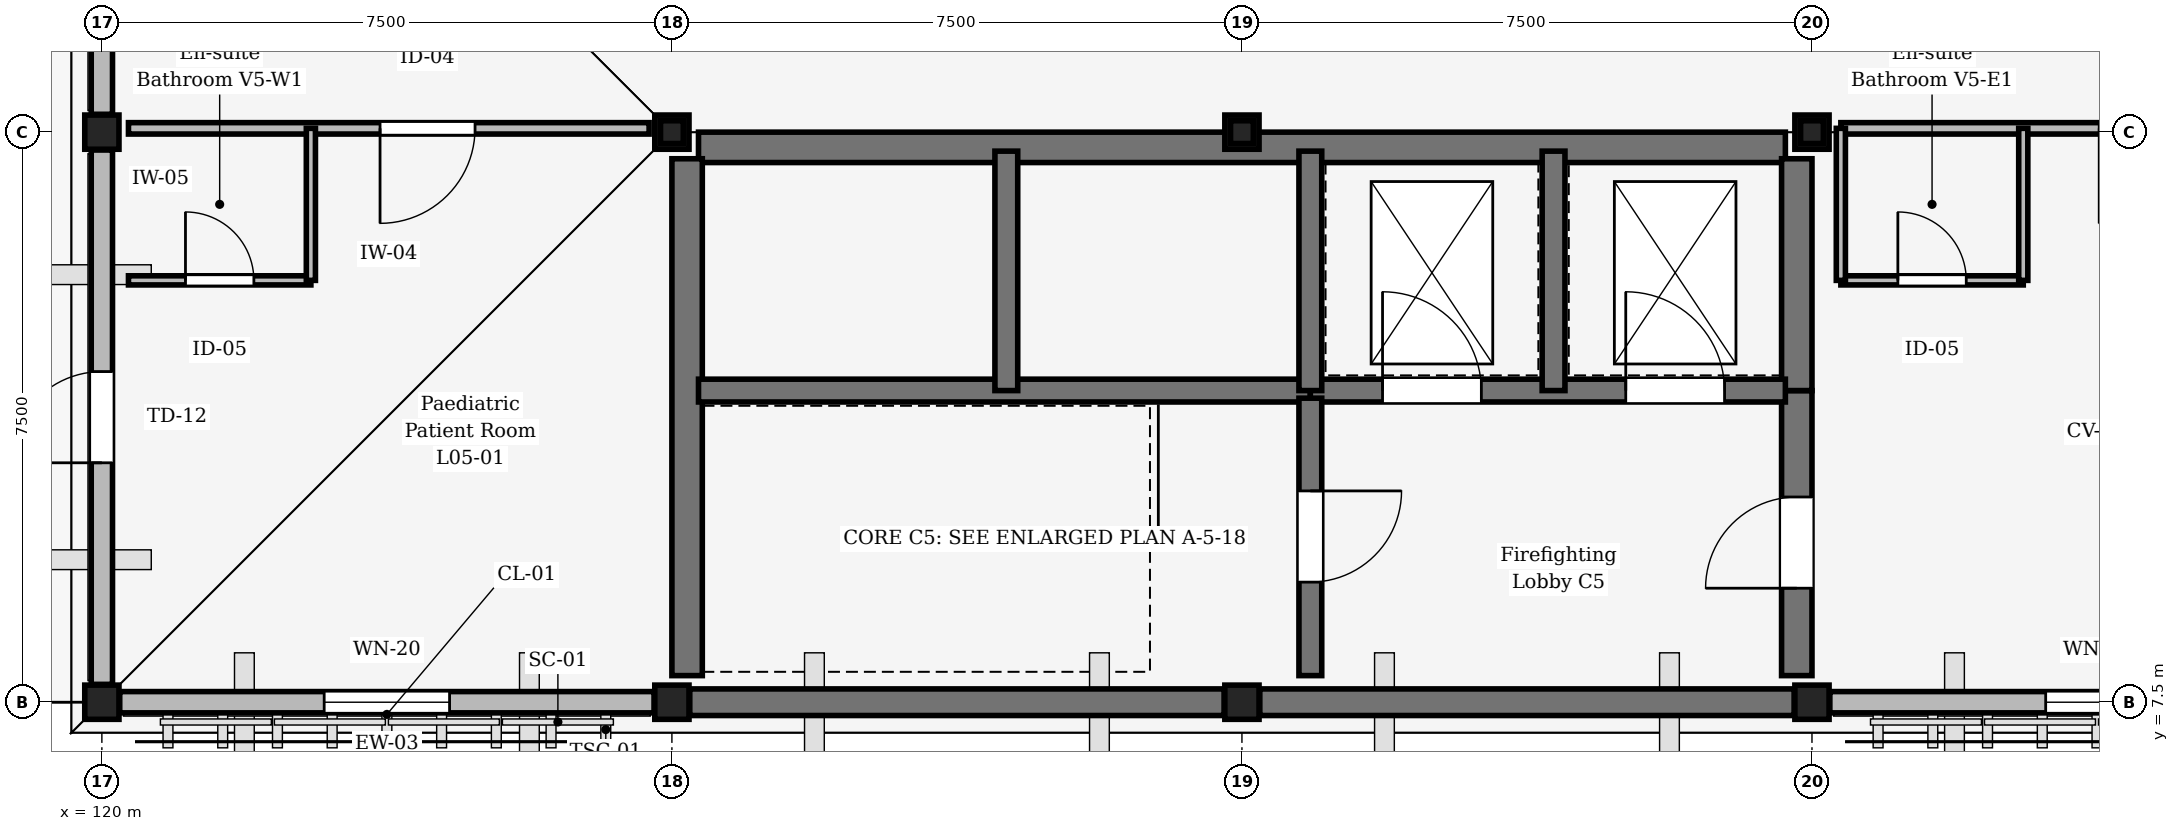
"""IFC4 building model, lengths in metres.
Left out: names, types, materials, properties, quantities, classifications, styles, units other than length and angle.
Written with IfcOpenShell. Run it as: python <this file> out.ifc"""

import sys

from ifc_helpers import new_model, si_unit, direction, frame, frame_2d, origin, origin_2d, place, context, subcontext, project, spatial, rectangle, i_section, extrude, element, fill, save


model = new_model("IFC4")
c1 = context("Model", 3, precision=1e-05, world=origin(), true_north=direction((0.0, 1.0)))
c2 = subcontext(c1, "Body", "Model", "MODEL_VIEW")
j1 = project(units=[si_unit("LENGTHUNIT", "METRE"), si_unit("PLANEANGLEUNIT", "RADIAN")], contexts=[c1])
p1 = place(None, origin())
s1 = spatial("IfcSite", under=j1, at=p1, CompositionType="ELEMENT")
p2 = place(p1, origin())
s2 = spatial("IfcBuilding", under=s1, at=p2, CompositionType="ELEMENT")
p3 = place(p2, frame((0.0, 0.0, 21.9)))
s3 = spatial("IfcBuildingStorey", under=s2, at=p3, CompositionType="ELEMENT", Elevation=21.9)
for number, where, z_axis, x_axis in (
    (1, (120.0, 7.5, 0.0), (0.0, 0.0, 1.0), (1.0, 0.0, 0.0)),
    (2, (120.0, 15.0, 0.0), (0.0, 0.0, 1.0), (1.0, 0.0, 0.0)),
    (3, (127.5, 7.5, 0.0), (0.0, 0.0, 1.0), (1.0, 0.0, 0.0)),
    (4, (127.5, 15.0, 0.0), (0.0, 0.0, 1.0), (1.0, 0.0, 0.0)),
    (5, (135.0, 7.5, 0.0), (0.0, 0.0, 1.0), (1.0, 0.0, 0.0)),
    (6, (135.0, 15.0, 0.0), (0.0, 0.0, 1.0), (1.0, 0.0, 0.0)),
    (7, (142.5, 7.5, 0.0), (0.0, 0.0, 1.0), (1.0, 0.0, 0.0)),
    (8, (142.5, 15.0, 0.0), (0.0, 0.0, 1.0), (1.0, 0.0, 0.0)),
):
    element("IfcColumn", number, at=place(p3, frame(where, z_axis=z_axis, x_axis=x_axis)), inside=s3, PredefinedType="COLUMN", context=c2, shape_type="SweptSolid", body=[
        extrude(rectangle(XDim=0.45, YDim=0.45, at=origin_2d()), origin(), (0.0, 0.0, 1.0), 4.05),
    ])
for number, where, z_axis, x_axis in (
    (9, (127.5, 15.0, 4.05), (0.0, 0.0, 1.0), (1.0, 0.0, 0.0)),
    (10, (135.0, 15.0, 4.05), (0.0, 0.0, 1.0), (1.0, 0.0, 0.0)),
    (11, (142.5, 15.0, 4.05), (0.0, 0.0, 1.0), (1.0, 0.0, 0.0)),
):
    element("IfcColumn", number, at=place(p3, frame(where, z_axis=z_axis, x_axis=x_axis)), inside=s3, PredefinedType="COLUMN", context=c2, shape_type="SweptSolid", body=[
        extrude(i_section(OverallWidth=0.3, OverallDepth=0.3, WebThickness=0.011, FlangeThickness=0.019, FilletRadius=0.027, at=origin_2d()), origin(), (0.0, 0.0, 1.0), 1.97),
    ])
p4 = place(p3, frame((127.265, 7.5, 0.0), z_axis=(0.0, 0.0, 1.0), x_axis=(-1.0, 0.0, 0.0)))
e12 = element("IfcWall", 12, at=p4, inside=s3, PredefinedType="STANDARD", context=c2, shape_type="SweptSolid", body=[
    extrude(rectangle(XDim=7.03, YDim=0.28, at=frame_2d((3.515, 0.0))), origin(), (0.0, 0.0, 1.0), 3.77),
])
p5 = place(p4, frame((2.69, 0.0, 0.85)))
e13 = element("IfcOpeningElement", 13, at=p5, cuts=e12, PredefinedType="OPENING", context=c2, shape_type="SweptSolid", body=[
    extrude(rectangle(XDim=1.65, YDim=2.25, at=frame_2d((0.825, 1.125))), frame((0.0, 0.15, 0.0), z_axis=(0.0, -1.0, 0.0), x_axis=(1.0, 0.0, 0.0)), (0.0, 0.0, 1.0), 0.3),
])
p6 = place(p3, frame((120.0, 7.735, 0.0), z_axis=(0.0, 0.0, 1.0), x_axis=(0.0, 1.0, 0.0)))
e14 = element("IfcWall", 14, at=p6, inside=s3, PredefinedType="STANDARD", context=c2, shape_type="SweptSolid", body=[
    extrude(rectangle(XDim=7.03, YDim=0.28, at=frame_2d((3.515, 0.0))), origin(), (0.0, 0.0, 1.0), 3.77),
])
p7 = place(p6, frame((2.915, 0.0, 0.0)))
e15 = element("IfcOpeningElement", 15, at=p7, cuts=e14, PredefinedType="OPENING", context=c2, shape_type="SweptSolid", body=[
    extrude(rectangle(XDim=1.2, YDim=2.3, at=frame_2d((0.6, 1.15))), frame((0.0, 0.15, 0.0), z_axis=(0.0, -1.0, 0.0), x_axis=(1.0, 0.0, 0.0)), (0.0, 0.0, 1.0), 0.3),
])
p8 = place(p3, frame((120.0, 15.235, 0.0), z_axis=(0.0, 0.0, 1.0), x_axis=(0.0, 1.0, 0.0)))
e16 = element("IfcWall", 16, at=p8, inside=s3, PredefinedType="STANDARD", context=c2, shape_type="SweptSolid", body=[
    extrude(rectangle(XDim=7.115, YDim=0.28, at=frame_2d((3.558, 0.0))), origin(), (0.0, 0.0, 1.0), 3.77),
])
p9 = place(p8, frame((2.958, 0.0, 0.0)))
e17 = element("IfcOpeningElement", 17, at=p9, cuts=e16, PredefinedType="OPENING", context=c2, shape_type="SweptSolid", body=[
    extrude(rectangle(XDim=1.2, YDim=2.3, at=frame_2d((0.6, 1.15))), frame((0.0, 0.15, 0.0), z_axis=(0.0, -1.0, 0.0), x_axis=(1.0, 0.0, 0.0)), (0.0, 0.0, 1.0), 0.3),
])
for number, where, z_axis, x_axis in (
    (18, (134.765, 7.5, 0.0), (0.0, 0.0, 1.0), (-1.0, 0.0, 0.0)),
    (19, (142.265, 7.5, 0.0), (0.0, 0.0, 1.0), (-1.0, 0.0, 0.0)),
):
    element("IfcWall", number, at=place(p3, frame(where, z_axis=z_axis, x_axis=x_axis)), inside=s3, PredefinedType="SHEAR", context=c2, shape_type="SweptSolid", body=[
        extrude(rectangle(XDim=7.03, YDim=0.35, at=frame_2d((3.515, 0.0))), origin(), (0.0, 0.0, 1.0), 3.77),
    ])
p10 = place(p3, frame((149.765, 7.5, 0.0), z_axis=(0.0, 0.0, 1.0), x_axis=(-1.0, 0.0, 0.0)))
e20 = element("IfcWall", 20, at=p10, inside=s3, PredefinedType="STANDARD", context=c2, shape_type="SweptSolid", body=[
    extrude(rectangle(XDim=7.03, YDim=0.28, at=frame_2d((3.515, 0.0))), origin(), (0.0, 0.0, 1.0), 3.77),
])
p11 = place(p10, frame((2.84, 0.0, 0.85)))
e21 = element("IfcOpeningElement", 21, at=p11, cuts=e20, PredefinedType="OPENING", context=c2, shape_type="SweptSolid", body=[
    extrude(rectangle(XDim=1.35, YDim=2.25, at=frame_2d((0.675, 1.125))), frame((0.0, 0.15, 0.0), z_axis=(0.0, -1.0, 0.0), x_axis=(1.0, 0.0, 0.0)), (0.0, 0.0, 1.0), 0.3),
])
p12 = place(p3, frame((127.85, 14.8, 0.0), z_axis=(0.0, 0.0, 1.0), x_axis=(1.0, 0.0, 0.0)))
e22 = element("IfcWall", 22, at=p12, inside=s3, PredefinedType="SHEAR", context=c2, shape_type="SweptSolid", body=[
    extrude(rectangle(XDim=14.3, YDim=0.4, at=frame_2d((7.15, 0.0))), origin(), (0.0, 0.0, 1.0), 3.77),
])
p13 = place(p3, frame((127.7, 7.85, 0.0), z_axis=(0.0, 0.0, 1.0), x_axis=(0.0, 1.0, 0.0)))
e23 = element("IfcWall", 23, at=p13, inside=s3, PredefinedType="SHEAR", context=c2, shape_type="SweptSolid", body=[
    extrude(rectangle(XDim=6.8, YDim=0.4, at=frame_2d((3.4, 0.0))), origin(), (0.0, 0.0, 1.0), 3.77),
])
p14 = place(p3, frame((142.3, 7.85, 0.0), z_axis=(0.0, 0.0, 1.0), x_axis=(0.0, 1.0, 0.0)))
e24 = element("IfcWall", 24, at=p14, inside=s3, PredefinedType="SHEAR", context=c2, shape_type="SweptSolid", body=[
    extrude(rectangle(XDim=3.75, YDim=0.4, at=frame_2d((1.875, 0.0))), origin(), (0.0, 0.0, 1.0), 3.77),
])
p15 = place(p14, frame((1.15, 0.0, 0.0)))
e25 = element("IfcOpeningElement", 25, at=p15, cuts=e24, PredefinedType="OPENING", context=c2, shape_type="SweptSolid", body=[
    extrude(rectangle(XDim=1.2, YDim=2.25, at=frame_2d((0.6, 1.125))), frame((0.0, 0.21, 0.0), z_axis=(0.0, -1.0, 0.0), x_axis=(1.0, 0.0, 0.0)), (0.0, 0.0, 1.0), 0.42),
])
p16 = place(p3, frame((142.3, 11.6, 0.0), z_axis=(0.0, 0.0, 1.0), x_axis=(0.0, 1.0, 0.0)))
e26 = element("IfcWall", 26, at=p16, inside=s3, PredefinedType="SHEAR", context=c2, shape_type="SweptSolid", body=[
    extrude(rectangle(XDim=3.05, YDim=0.4, at=frame_2d((1.525, 0.0))), origin(), (0.0, 0.0, 1.0), 3.77),
])
p17 = place(p3, frame((127.85, 11.6, 0.0), z_axis=(0.0, 0.0, 1.0), x_axis=(1.0, 0.0, 0.0)))
e27 = element("IfcWall", 27, at=p17, inside=s3, PredefinedType="SHEAR", context=c2, shape_type="SweptSolid", body=[
    extrude(rectangle(XDim=8.05, YDim=0.3, at=frame_2d((4.025, 0.0))), origin(), (0.0, 0.0, 1.0), 3.77),
])
p18 = place(p3, frame((135.9, 11.6, 0.0), z_axis=(0.0, 0.0, 1.0), x_axis=(1.0, 0.0, 0.0)))
e28 = element("IfcWall", 28, at=p18, inside=s3, PredefinedType="SHEAR", context=c2, shape_type="SweptSolid", body=[
    extrude(rectangle(XDim=6.25, YDim=0.3, at=frame_2d((3.125, 0.0))), origin(), (0.0, 0.0, 1.0), 3.77),
])
p19 = place(p18, frame((0.95, 0.0, 0.0)))
e29 = element("IfcOpeningElement", 29, at=p19, cuts=e28, PredefinedType="OPENING", context=c2, shape_type="SweptSolid", body=[
    extrude(rectangle(XDim=1.3, YDim=2.2, at=frame_2d((0.65, 1.1))), frame((0.0, 0.16, 0.0), z_axis=(0.0, -1.0, 0.0), x_axis=(1.0, 0.0, 0.0)), (0.0, 0.0, 1.0), 0.32),
])
p20 = place(p18, frame((4.15, 0.0, 0.0)))
e30 = element("IfcOpeningElement", 30, at=p20, cuts=e28, PredefinedType="OPENING", context=c2, shape_type="SweptSolid", body=[
    extrude(rectangle(XDim=1.3, YDim=2.2, at=frame_2d((0.65, 1.1))), frame((0.0, 0.16, 0.0), z_axis=(0.0, -1.0, 0.0), x_axis=(1.0, 0.0, 0.0)), (0.0, 0.0, 1.0), 0.32),
])
p21 = place(p3, frame((135.9, 11.5, 0.0), z_axis=(0.0, 0.0, 1.0), x_axis=(0.0, -1.0, 0.0)))
e31 = element("IfcWall", 31, at=p21, inside=s3, PredefinedType="SHEAR", context=c2, shape_type="SweptSolid", body=[
    extrude(rectangle(XDim=3.65, YDim=0.3, at=frame_2d((1.825, 0.0))), origin(), (0.0, 0.0, 1.0), 3.77),
])
p22 = place(p21, frame((1.22, 0.0, 0.0)))
e32 = element("IfcOpeningElement", 32, at=p22, cuts=e31, PredefinedType="OPENING", context=c2, shape_type="SweptSolid", body=[
    extrude(rectangle(XDim=1.2, YDim=2.25, at=frame_2d((0.6, 1.125))), frame((0.0, 0.16, 0.0), z_axis=(0.0, -1.0, 0.0), x_axis=(1.0, 0.0, 0.0)), (0.0, 0.0, 1.0), 0.32),
])
for number, where, z_axis, x_axis in (
    (33, (131.9, 11.6, 0.0), (0.0, 0.0, 1.0), (0.0, 1.0, 0.0)),
    (34, (135.9, 11.6, 0.0), (0.0, 0.0, 1.0), (0.0, 1.0, 0.0)),
    (35, (139.1, 11.6, 0.0), (0.0, 0.0, 1.0), (0.0, 1.0, 0.0)),
):
    element("IfcWall", number, at=place(p3, frame(where, z_axis=z_axis, x_axis=x_axis)), inside=s3, PredefinedType="SHEAR", context=c2, shape_type="SweptSolid", body=[
        extrude(rectangle(XDim=3.15, YDim=0.3, at=frame_2d((1.575, 0.0))), origin(), (0.0, 0.0, 1.0), 3.77),
    ])
p23 = place(p3, frame((127.2, 15.05, 0.0), z_axis=(0.0, 0.0, 1.0), x_axis=(-1.0, 0.0, 0.0)))
e36 = element("IfcWall", 36, at=p23, inside=s3, PredefinedType="PARTITIONING", context=c2, shape_type="SweptSolid", body=[
    extrude(rectangle(XDim=6.85, YDim=0.15, at=frame_2d((3.425, 0.0))), origin(), (0.0, 0.0, 1.0), 3.755),
])
p24 = place(p23, frame((2.29, 0.0, 0.0)))
e37 = element("IfcOpeningElement", 37, at=p24, cuts=e36, PredefinedType="OPENING", context=c2, shape_type="SweptSolid", body=[
    extrude(rectangle(XDim=1.25, YDim=2.2, at=frame_2d((0.625, 1.1))), frame((0.0, 0.085, 0.0), z_axis=(0.0, -1.0, 0.0), x_axis=(1.0, 0.0, 0.0)), (0.0, 0.0, 1.0), 0.17),
])
p25 = place(p3, frame((120.35, 13.05, 0.0), z_axis=(0.0, 0.0, 1.0), x_axis=(1.0, 0.0, 0.0)))
e38 = element("IfcWall", 38, at=p25, inside=s3, PredefinedType="PARTITIONING", context=c2, shape_type="SweptSolid", body=[
    extrude(rectangle(XDim=2.4, YDim=0.12, at=frame_2d((1.2, 0.0))), origin(), (0.0, 0.0, 1.0), 3.755),
])
p26 = place(p25, frame((0.75, 0.0, 0.0)))
e39 = element("IfcOpeningElement", 39, at=p26, cuts=e38, PredefinedType="OPENING", context=c2, shape_type="SweptSolid", body=[
    extrude(rectangle(XDim=0.9, YDim=2.1, at=frame_2d((0.45, 1.05))), frame((0.0, 0.07, 0.0), z_axis=(0.0, -1.0, 0.0), x_axis=(1.0, 0.0, 0.0)), (0.0, 0.0, 1.0), 0.14),
])
p27 = place(p3, frame((122.75, 13.05, 0.0), z_axis=(0.0, 0.0, 1.0), x_axis=(0.0, 1.0, 0.0)))
e40 = element("IfcWall", 40, at=p27, inside=s3, PredefinedType="PARTITIONING", context=c2, shape_type="SweptSolid", body=[
    extrude(rectangle(XDim=2.0, YDim=0.12, at=frame_2d((1.0, 0.0))), origin(), (0.0, 0.0, 1.0), 3.755),
])
p28 = place(p3, frame((152.503, 15.05, 0.0), z_axis=(0.0, 0.0, 1.0), x_axis=(-1.0, 0.0, 0.0)))
e41 = element("IfcWall", 41, at=p28, inside=s3, PredefinedType="PARTITIONING", context=c2, shape_type="SweptSolid", body=[
    extrude(rectangle(XDim=9.624, YDim=0.15, at=frame_2d((4.812, 0.0))), origin(), (0.0, 0.0, 1.0), 3.755),
])
p29 = place(p28, frame((4.974, 0.0, 0.0)))
e42 = element("IfcOpeningElement", 42, at=p29, cuts=e41, PredefinedType="OPENING", context=c2, shape_type="SweptSolid", body=[
    extrude(rectangle(XDim=1.25, YDim=2.2, at=frame_2d((0.625, 1.1))), frame((0.0, 0.085, 0.0), z_axis=(0.0, -1.0, 0.0), x_axis=(1.0, 0.0, 0.0)), (0.0, 0.0, 1.0), 0.17),
])
p30 = place(p3, frame((142.88, 13.05, 0.0), z_axis=(0.0, 0.0, 1.0), x_axis=(1.0, 0.0, 0.0)))
e43 = element("IfcWall", 43, at=p30, inside=s3, PredefinedType="PARTITIONING", context=c2, shape_type="SweptSolid", body=[
    extrude(rectangle(XDim=2.4, YDim=0.12, at=frame_2d((1.2, 0.0))), origin(), (0.0, 0.0, 1.0), 3.755),
])
p31 = place(p30, frame((0.75, 0.0, 0.0)))
e44 = element("IfcOpeningElement", 44, at=p31, cuts=e43, PredefinedType="OPENING", context=c2, shape_type="SweptSolid", body=[
    extrude(rectangle(XDim=0.9, YDim=2.1, at=frame_2d((0.45, 1.05))), frame((0.0, 0.07, 0.0), z_axis=(0.0, -1.0, 0.0), x_axis=(1.0, 0.0, 0.0)), (0.0, 0.0, 1.0), 0.14),
])
for number, where, z_axis, x_axis in (
    (45, (145.28, 13.05, 0.0), (0.0, 0.0, 1.0), (0.0, 1.0, 0.0)),
    (46, (142.88, 13.05, 0.0), (0.0, 0.0, 1.0), (0.0, 1.0, 0.0)),
):
    element("IfcWall", number, at=place(p3, frame(where, z_axis=z_axis, x_axis=x_axis)), inside=s3, PredefinedType="PARTITIONING", context=c2, shape_type="SweptSolid", body=[
        extrude(rectangle(XDim=2.0, YDim=0.12, at=frame_2d((1.0, 0.0))), origin(), (0.0, 0.0, 1.0), 3.755),
    ])
p32 = place(p5, origin())
e47 = element("IfcWindow", 47, at=p32, inside=s3, PartitioningType="SINGLE_PANEL", PredefinedType="WINDOW", context=c2, shape_type="SweptSolid", body=[
    extrude(rectangle(XDim=1.65, YDim=2.25, at=frame_2d((0.825, 1.125))), frame((0.0, 0.03, 0.0), z_axis=(0.0, -1.0, 0.0), x_axis=(1.0, 0.0, 0.0)), (0.0, 0.0, 1.0), 0.06),
])
fill(e13, e47)
p33 = place(p7, origin())
e48 = element("IfcDoor", 48, at=p33, inside=s3, OperationType="SINGLE_SWING_LEFT", PredefinedType="DOOR", context=c2, shape_type="SweptSolid", body=[
    extrude(rectangle(XDim=1.2, YDim=2.3, at=frame_2d((0.6, 1.15))), frame((0.0, 0.025, 0.0), z_axis=(0.0, -1.0, 0.0), x_axis=(1.0, 0.0, 0.0)), (0.0, 0.0, 1.0), 0.05),
])
fill(e15, e48)
p34 = place(p11, origin())
e49 = element("IfcWindow", 49, at=p34, inside=s3, PartitioningType="SINGLE_PANEL", PredefinedType="WINDOW", context=c2, shape_type="SweptSolid", body=[
    extrude(rectangle(XDim=1.35, YDim=2.25, at=frame_2d((0.675, 1.125))), frame((0.0, 0.03, 0.0), z_axis=(0.0, -1.0, 0.0), x_axis=(1.0, 0.0, 0.0)), (0.0, 0.0, 1.0), 0.06),
])
fill(e21, e49)
p35 = place(p15, origin())
e50 = element("IfcDoor", 50, at=p35, inside=s3, OperationType="SINGLE_SWING_LEFT", PredefinedType="DOOR", context=c2, shape_type="SweptSolid", body=[
    extrude(rectangle(XDim=1.2, YDim=2.25, at=frame_2d((0.6, 1.125))), frame((0.0, 0.025, 0.0), z_axis=(0.0, -1.0, 0.0), x_axis=(1.0, 0.0, 0.0)), (0.0, 0.0, 1.0), 0.05),
])
fill(e25, e50)
p36 = place(p19, origin())
e51 = element("IfcDoor", 51, at=p36, inside=s3, OperationType="DOUBLE_DOOR_SLIDING", PredefinedType="DOOR", context=c2, shape_type="SweptSolid", body=[
    extrude(rectangle(XDim=1.3, YDim=2.2, at=frame_2d((0.65, 1.1))), frame((0.0, 0.025, 0.0), z_axis=(0.0, -1.0, 0.0), x_axis=(1.0, 0.0, 0.0)), (0.0, 0.0, 1.0), 0.05),
])
fill(e29, e51)
p37 = place(p20, origin())
e52 = element("IfcDoor", 52, at=p37, inside=s3, OperationType="DOUBLE_DOOR_SLIDING", PredefinedType="DOOR", context=c2, shape_type="SweptSolid", body=[
    extrude(rectangle(XDim=1.3, YDim=2.2, at=frame_2d((0.65, 1.1))), frame((0.0, 0.025, 0.0), z_axis=(0.0, -1.0, 0.0), x_axis=(1.0, 0.0, 0.0)), (0.0, 0.0, 1.0), 0.05),
])
fill(e30, e52)
p38 = place(p22, origin())
e53 = element("IfcDoor", 53, at=p38, inside=s3, OperationType="SINGLE_SWING_LEFT", PredefinedType="DOOR", context=c2, shape_type="SweptSolid", body=[
    extrude(rectangle(XDim=1.2, YDim=2.25, at=frame_2d((0.6, 1.125))), frame((0.0, 0.025, 0.0), z_axis=(0.0, -1.0, 0.0), x_axis=(1.0, 0.0, 0.0)), (0.0, 0.0, 1.0), 0.05),
])
fill(e32, e53)
p39 = place(p24, origin())
e54 = element("IfcDoor", 54, at=p39, inside=s3, OperationType="SINGLE_SWING_RIGHT", PredefinedType="DOOR", context=c2, shape_type="SweptSolid", body=[
    extrude(rectangle(XDim=1.25, YDim=2.2, at=frame_2d((0.625, 1.1))), frame((0.0, 0.025, 0.0), z_axis=(0.0, -1.0, 0.0), x_axis=(1.0, 0.0, 0.0)), (0.0, 0.0, 1.0), 0.05),
])
fill(e37, e54)
p40 = place(p26, origin())
e55 = element("IfcDoor", 55, at=p40, inside=s3, OperationType="SINGLE_SWING_LEFT", PredefinedType="DOOR", context=c2, shape_type="SweptSolid", body=[
    extrude(rectangle(XDim=0.9, YDim=2.1, at=frame_2d((0.45, 1.05))), frame((0.0, 0.025, 0.0), z_axis=(0.0, -1.0, 0.0), x_axis=(1.0, 0.0, 0.0)), (0.0, 0.0, 1.0), 0.05),
])
fill(e39, e55)
p41 = place(p29, origin())
e56 = element("IfcDoor", 56, at=p41, inside=s3, OperationType="SINGLE_SWING_RIGHT", PredefinedType="DOOR", context=c2, shape_type="SweptSolid", body=[
    extrude(rectangle(XDim=1.25, YDim=2.2, at=frame_2d((0.625, 1.1))), frame((0.0, 0.025, 0.0), z_axis=(0.0, -1.0, 0.0), x_axis=(1.0, 0.0, 0.0)), (0.0, 0.0, 1.0), 0.05),
])
fill(e42, e56)
p42 = place(p31, origin())
e57 = element("IfcDoor", 57, at=p42, inside=s3, OperationType="SINGLE_SWING_LEFT", PredefinedType="DOOR", context=c2, shape_type="SweptSolid", body=[
    extrude(rectangle(XDim=0.9, YDim=2.1, at=frame_2d((0.45, 1.05))), frame((0.0, 0.025, 0.0), z_axis=(0.0, -1.0, 0.0), x_axis=(1.0, 0.0, 0.0)), (0.0, 0.0, 1.0), 0.05),
])
fill(e44, e57)
save(model, sys.argv[1])
